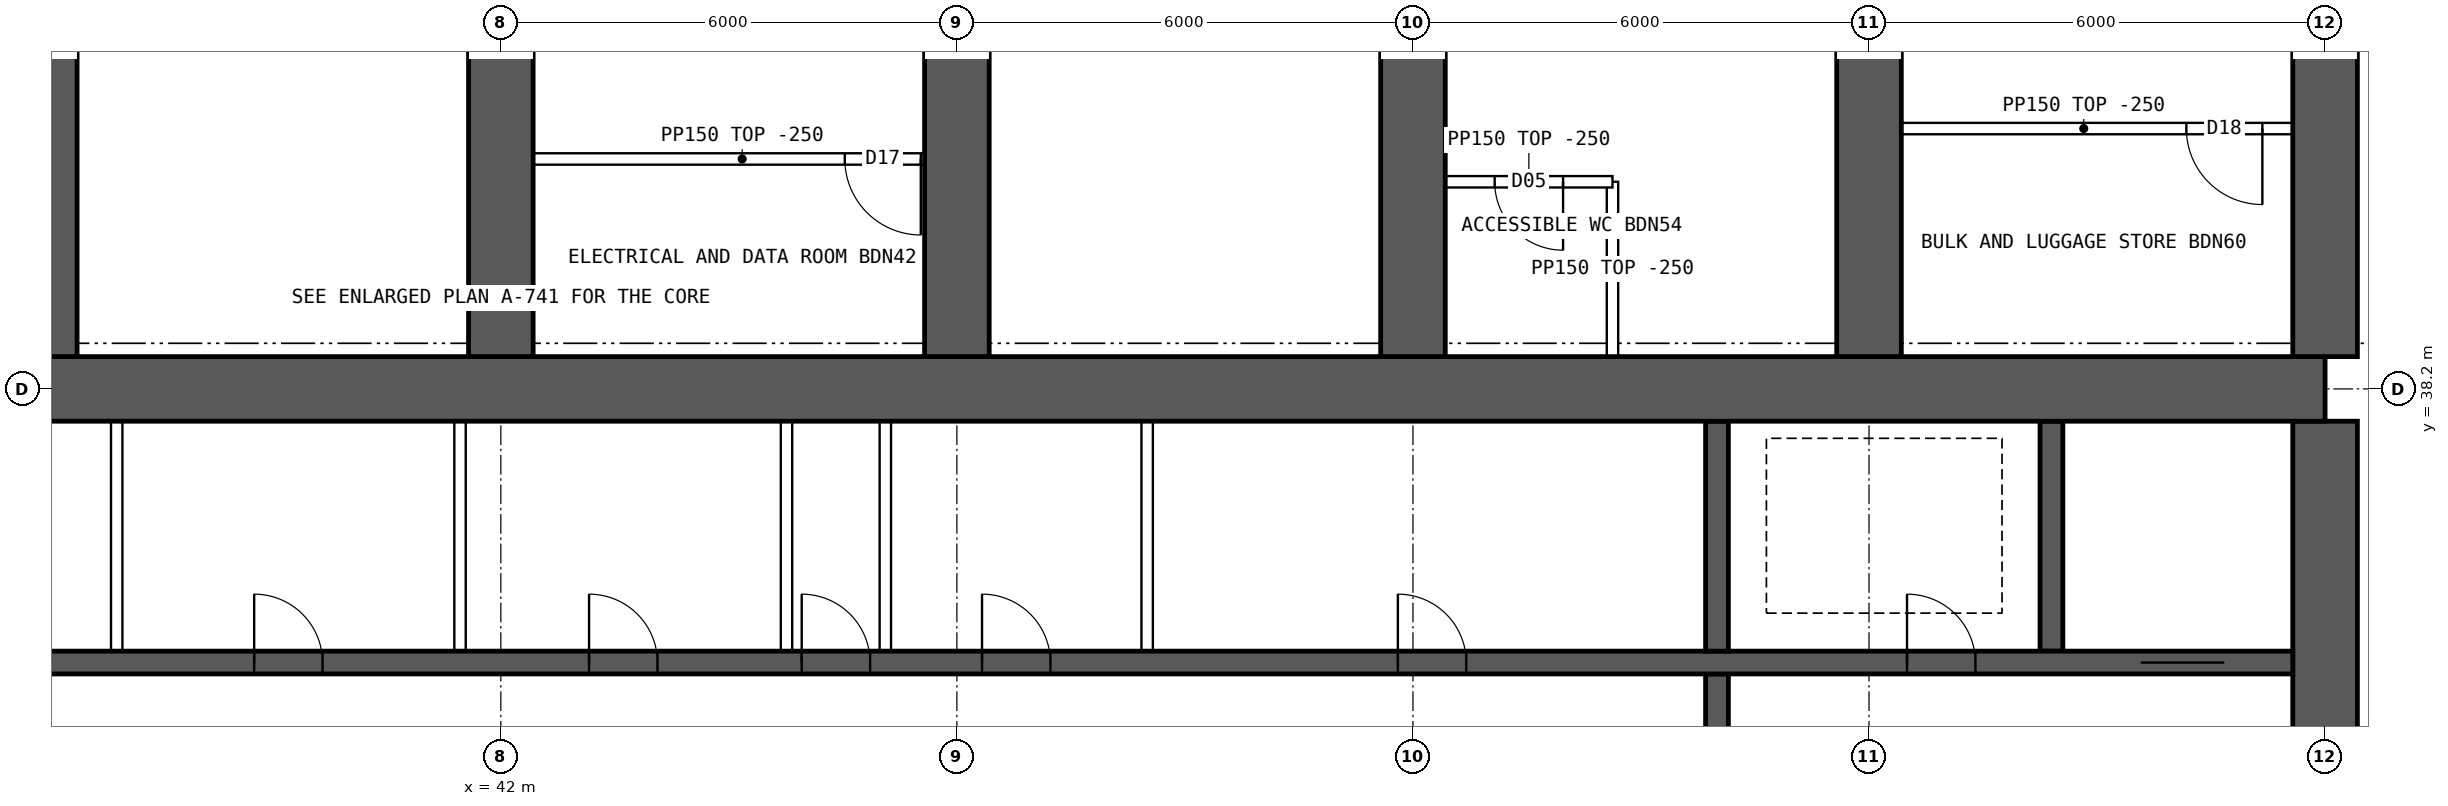
"""IFC4 building model, lengths in metres.
Left out: names, types, materials, properties, quantities, classifications, styles, units other than length and angle.
Written with IfcOpenShell. Run it as: python <this file> out.ifc"""

import sys

from ifc_helpers import new_model, si_unit, direction, frame, frame_2d, origin, place, context, subcontext, project, spatial, rectangle, extrude, element, fill, save


model = new_model("IFC4")
c1 = context("Model", 3, precision=1e-05, world=origin(), true_north=direction((0.0, 1.0)))
c2 = subcontext(c1, "Body", "Model", "MODEL_VIEW")
j1 = project(units=[si_unit("LENGTHUNIT", "METRE"), si_unit("PLANEANGLEUNIT", "RADIAN")], contexts=[c1])
p1 = place(None, origin())
s1 = spatial("IfcSite", under=j1, at=p1, CompositionType="ELEMENT")
p2 = place(p1, origin())
s2 = spatial("IfcBuilding", under=s1, at=p2, CompositionType="ELEMENT")
p3 = place(p2, frame((0.0, 0.0, 156.1)))
s3 = spatial("IfcBuildingStorey", under=s2, at=p3, CompositionType="ELEMENT", Elevation=156.1)
p4 = place(p3, frame((18.0, 38.2, 0.0), z_axis=(0.0, 0.0, 1.0), x_axis=(1.0, 0.0, 0.0)))
e1 = element("IfcWall", 1, at=p4, inside=s3, PredefinedType="SHEAR", context=c2, shape_type="SweptSolid", body=[
    extrude(rectangle(XDim=48.0, YDim=0.85, at=frame_2d((24.0, 0.0))), origin(), (0.0, 0.0, 1.0), 3.75),
])
p5 = place(p3, frame((66.0, 26.225, 0.0), z_axis=(0.0, 0.0, 1.0), x_axis=(0.0, 1.0, 0.0)))
e2 = element("IfcWall", 2, at=p5, inside=s3, PredefinedType="SHEAR", context=c2, shape_type="SweptSolid", body=[
    extrude(rectangle(XDim=11.55, YDim=0.85, at=frame_2d((5.775, 0.0))), origin(), (0.0, 0.0, 1.0), 3.75),
])
p6 = place(p5, frame((5.075, 0.0, 0.0)))
e3 = element("IfcOpeningElement", 3, at=p6, cuts=e2, PredefinedType="OPENING", context=c2, shape_type="SweptSolid", body=[
    extrude(rectangle(XDim=1.2, YDim=2.1, at=frame_2d((0.6, 1.05))), frame((0.0, 0.435, 0.0), z_axis=(0.0, -1.0, 0.0), x_axis=(1.0, 0.0, 0.0)), (0.0, 0.0, 1.0), 0.87),
])
p7 = place(p3, frame((18.425, 34.6, 0.0), z_axis=(0.0, 0.0, 1.0), x_axis=(1.0, 0.0, 0.0)))
e4 = element("IfcWall", 4, at=p7, inside=s3, PredefinedType="SHEAR", context=c2, shape_type="SweptSolid", body=[
    extrude(rectangle(XDim=47.15, YDim=0.3, at=frame_2d((23.575, 0.0))), origin(), (0.0, 0.0, 1.0), 3.75),
])
p8 = place(p7, frame((0.9, 0.0, 0.0)))
e5 = element("IfcOpeningElement", 5, at=p8, cuts=e4, PredefinedType="OPENING", context=c2, shape_type="SweptSolid", body=[
    extrude(rectangle(XDim=1.1, YDim=2.1, at=frame_2d((0.55, 1.05))), frame((0.0, 0.16, 0.0), z_axis=(0.0, -1.0, 0.0), x_axis=(1.0, 0.0, 0.0)), (0.0, 0.0, 1.0), 0.32),
])
p9 = place(p7, frame((45.15, 0.0, 0.0)))
e6 = element("IfcOpeningElement", 6, at=p9, cuts=e4, PredefinedType="OPENING", context=c2, shape_type="SweptSolid", body=[
    extrude(rectangle(XDim=1.1, YDim=2.1, at=frame_2d((0.55, 1.05))), frame((0.0, 0.16, 0.0), z_axis=(0.0, -1.0, 0.0), x_axis=(1.0, 0.0, 0.0)), (0.0, 0.0, 1.0), 0.32),
])
p10 = place(p7, frame((4.175, 0.0, 0.0)))
e7 = element("IfcOpeningElement", 7, at=p10, cuts=e4, PredefinedType="OPENING", context=c2, shape_type="SweptSolid", body=[
    extrude(rectangle(XDim=0.9, YDim=2.1, at=frame_2d((0.45, 1.05))), frame((0.0, 0.16, 0.0), z_axis=(0.0, -1.0, 0.0), x_axis=(1.0, 0.0, 0.0)), (0.0, 0.0, 1.0), 0.32),
])
p11 = place(p7, frame((42.075, 0.0, 0.0)))
e8 = element("IfcOpeningElement", 8, at=p11, cuts=e4, PredefinedType="OPENING", context=c2, shape_type="SweptSolid", body=[
    extrude(rectangle(XDim=0.9, YDim=2.1, at=frame_2d((0.45, 1.05))), frame((0.0, 0.16, 0.0), z_axis=(0.0, -1.0, 0.0), x_axis=(1.0, 0.0, 0.0)), (0.0, 0.0, 1.0), 0.32),
])
p12 = place(p7, frame((8.95, 0.0, 0.0)))
e9 = element("IfcOpeningElement", 9, at=p12, cuts=e4, PredefinedType="OPENING", context=c2, shape_type="SweptSolid", body=[
    extrude(rectangle(XDim=0.9, YDim=2.1, at=frame_2d((0.45, 1.05))), frame((0.0, 0.16, 0.0), z_axis=(0.0, -1.0, 0.0), x_axis=(1.0, 0.0, 0.0)), (0.0, 0.0, 1.0), 0.32),
])
p13 = place(p7, frame((12.924, 0.0, 0.0)))
e10 = element("IfcOpeningElement", 10, at=p13, cuts=e4, PredefinedType="OPENING", context=c2, shape_type="SweptSolid", body=[
    extrude(rectangle(XDim=0.9, YDim=2.1, at=frame_2d((0.45, 1.05))), frame((0.0, 0.16, 0.0), z_axis=(0.0, -1.0, 0.0), x_axis=(1.0, 0.0, 0.0)), (0.0, 0.0, 1.0), 0.32),
])
p14 = place(p7, frame((16.571, 0.0, 0.0)))
e11 = element("IfcOpeningElement", 11, at=p14, cuts=e4, PredefinedType="OPENING", context=c2, shape_type="SweptSolid", body=[
    extrude(rectangle(XDim=0.9, YDim=2.1, at=frame_2d((0.45, 1.05))), frame((0.0, 0.16, 0.0), z_axis=(0.0, -1.0, 0.0), x_axis=(1.0, 0.0, 0.0)), (0.0, 0.0, 1.0), 0.32),
])
p15 = place(p7, frame((20.33, 0.0, 0.0)))
e12 = element("IfcOpeningElement", 12, at=p15, cuts=e4, PredefinedType="OPENING", context=c2, shape_type="SweptSolid", body=[
    extrude(rectangle(XDim=0.9, YDim=2.1, at=frame_2d((0.45, 1.05))), frame((0.0, 0.16, 0.0), z_axis=(0.0, -1.0, 0.0), x_axis=(1.0, 0.0, 0.0)), (0.0, 0.0, 1.0), 0.32),
])
p16 = place(p7, frame((24.736, 0.0, 0.0)))
e13 = element("IfcOpeningElement", 13, at=p16, cuts=e4, PredefinedType="OPENING", context=c2, shape_type="SweptSolid", body=[
    extrude(rectangle(XDim=0.9, YDim=2.1, at=frame_2d((0.45, 1.05))), frame((0.0, 0.16, 0.0), z_axis=(0.0, -1.0, 0.0), x_axis=(1.0, 0.0, 0.0)), (0.0, 0.0, 1.0), 0.32),
])
p17 = place(p7, frame((27.533, 0.0, 0.0)))
e14 = element("IfcOpeningElement", 14, at=p17, cuts=e4, PredefinedType="OPENING", context=c2, shape_type="SweptSolid", body=[
    extrude(rectangle(XDim=0.9, YDim=2.1, at=frame_2d((0.45, 1.05))), frame((0.0, 0.16, 0.0), z_axis=(0.0, -1.0, 0.0), x_axis=(1.0, 0.0, 0.0)), (0.0, 0.0, 1.0), 0.32),
])
p18 = place(p7, frame((29.906, 0.0, 0.0)))
e15 = element("IfcOpeningElement", 15, at=p18, cuts=e4, PredefinedType="OPENING", context=c2, shape_type="SweptSolid", body=[
    extrude(rectangle(XDim=0.9, YDim=2.1, at=frame_2d((0.45, 1.05))), frame((0.0, 0.16, 0.0), z_axis=(0.0, -1.0, 0.0), x_axis=(1.0, 0.0, 0.0)), (0.0, 0.0, 1.0), 0.32),
])
p19 = place(p7, frame((35.376, 0.0, 0.0)))
e16 = element("IfcOpeningElement", 16, at=p19, cuts=e4, PredefinedType="OPENING", context=c2, shape_type="SweptSolid", body=[
    extrude(rectangle(XDim=0.9, YDim=2.1, at=frame_2d((0.45, 1.05))), frame((0.0, 0.16, 0.0), z_axis=(0.0, -1.0, 0.0), x_axis=(1.0, 0.0, 0.0)), (0.0, 0.0, 1.0), 0.32),
])
p20 = place(p3, frame((58.0, 30.55, 0.0), z_axis=(0.0, 0.0, 1.0), x_axis=(0.0, 1.0, 0.0)))
e17 = element("IfcWall", 17, at=p20, inside=s3, PredefinedType="SHEAR", context=c2, shape_type="SweptSolid", body=[
    extrude(rectangle(XDim=3.9, YDim=0.3, at=frame_2d((1.95, 0.0))), origin(), (0.0, 0.0, 1.0), 3.75),
])
p21 = place(p20, frame((1.4, 0.0, 0.0)))
e18 = element("IfcOpeningElement", 18, at=p21, cuts=e17, PredefinedType="OPENING", context=c2, shape_type="SweptSolid", body=[
    extrude(rectangle(XDim=1.2, YDim=2.1, at=frame_2d((0.6, 1.05))), frame((0.0, 0.16, 0.0), z_axis=(0.0, -1.0, 0.0), x_axis=(1.0, 0.0, 0.0)), (0.0, 0.0, 1.0), 0.32),
])
for number, where, z_axis, x_axis in (
    (19, (62.4, 34.75, 0.0), (0.0, 0.0, 1.0), (0.0, 1.0, 0.0)),
    (20, (58.0, 34.75, 0.0), (0.0, 0.0, 1.0), (0.0, 1.0, 0.0)),
):
    element("IfcWall", number, at=place(p3, frame(where, z_axis=z_axis, x_axis=x_axis)), inside=s3, PredefinedType="SHEAR", context=c2, shape_type="SweptSolid", body=[
        extrude(rectangle(XDim=3.025, YDim=0.3, at=frame_2d((1.512, 0.0))), origin(), (0.0, 0.0, 1.0), 3.75),
    ])
for number, where, z_axis, x_axis in (
    (21, (36.0, 38.625, 0.0), (0.0, 0.0, 1.0), (0.0, 1.0, 0.0)),
    (22, (42.0, 38.625, 0.0), (0.0, 0.0, 1.0), (0.0, 1.0, 0.0)),
    (23, (48.0, 38.625, 0.0), (0.0, 0.0, 1.0), (0.0, 1.0, 0.0)),
    (24, (54.0, 38.625, 0.0), (0.0, 0.0, 1.0), (0.0, 1.0, 0.0)),
    (25, (60.0, 38.625, 0.0), (0.0, 0.0, 1.0), (0.0, 1.0, 0.0)),
    (26, (66.0, 38.625, 0.0), (0.0, 0.0, 1.0), (0.0, 1.0, 0.0)),
):
    element("IfcWall", number, at=place(p3, frame(where, z_axis=z_axis, x_axis=x_axis)), inside=s3, PredefinedType="SHEAR", context=c2, shape_type="SweptSolid", body=[
        extrude(rectangle(XDim=8.175, YDim=0.85, at=frame_2d((4.087, 0.0))), origin(), (0.0, 0.0, 1.0), 3.75),
    ])
for number, where, z_axis, x_axis in (
    (27, (36.946, 34.75, 0.0), (0.0, 0.0, 1.0), (0.0, 1.0, 0.0)),
    (28, (41.463, 34.75, 0.0), (0.0, 0.0, 1.0), (0.0, 1.0, 0.0)),
    (29, (45.758, 34.75, 0.0), (0.0, 0.0, 1.0), (0.0, 1.0, 0.0)),
    (30, (47.058, 34.75, 0.0), (0.0, 0.0, 1.0), (0.0, 1.0, 0.0)),
    (31, (50.503, 34.75, 0.0), (0.0, 0.0, 1.0), (0.0, 1.0, 0.0)),
):
    element("IfcWall", number, at=place(p3, frame(where, z_axis=z_axis, x_axis=x_axis)), inside=s3, PredefinedType="SOLIDWALL", context=c2, shape_type="SweptSolid", body=[
        extrude(rectangle(XDim=3.025, YDim=0.15, at=frame_2d((1.512, 0.0))), origin(), (0.0, 0.0, 1.0), 3.5),
    ])
p22 = place(p3, frame((47.925, 41.225, 0.0), z_axis=(0.0, 0.0, 1.0), x_axis=(-1.0, 0.0, 0.0)))
e32 = element("IfcWall", 32, at=p22, inside=s3, PredefinedType="PARTITIONING", context=c2, shape_type="SweptSolid", body=[
    extrude(rectangle(XDim=5.5, YDim=0.15, at=frame_2d((2.75, 0.0))), origin(), (0.0, 0.0, 1.0), 3.5),
])
p23 = place(p22, frame((0.4, 0.0, 0.0)))
e33 = element("IfcOpeningElement", 33, at=p23, cuts=e32, PredefinedType="OPENING", context=c2, shape_type="SweptSolid", body=[
    extrude(rectangle(XDim=1.0, YDim=2.1, at=frame_2d((0.5, 1.05))), frame((0.0, 0.085, 0.0), z_axis=(0.0, -1.0, 0.0), x_axis=(1.0, 0.0, 0.0)), (0.0, 0.0, 1.0), 0.17),
])
p24 = place(p3, frame((56.625, 40.925, 0.0), z_axis=(0.0, 0.0, 1.0), x_axis=(0.0, -1.0, 0.0)))
e34 = element("IfcWall", 34, at=p24, inside=s3, PredefinedType="PARTITIONING", context=c2, shape_type="SweptSolid", body=[
    extrude(rectangle(XDim=2.3, YDim=0.15, at=frame_2d((1.15, 0.0))), origin(), (0.0, 0.0, 1.0), 3.5),
])
p25 = place(p3, frame((56.625, 40.925, 0.0), z_axis=(0.0, 0.0, 1.0), x_axis=(-1.0, 0.0, 0.0)))
e35 = element("IfcWall", 35, at=p25, inside=s3, PredefinedType="PARTITIONING", context=c2, shape_type="SweptSolid", body=[
    extrude(rectangle(XDim=2.2, YDim=0.15, at=frame_2d((1.1, 0.0))), origin(), (0.0, 0.0, 1.0), 3.5),
])
p26 = place(p25, frame((0.65, 0.0, 0.0)))
e36 = element("IfcOpeningElement", 36, at=p26, cuts=e35, PredefinedType="OPENING", context=c2, shape_type="SweptSolid", body=[
    extrude(rectangle(XDim=0.9, YDim=2.1, at=frame_2d((0.45, 1.05))), frame((0.0, 0.085, 0.0), z_axis=(0.0, -1.0, 0.0), x_axis=(1.0, 0.0, 0.0)), (0.0, 0.0, 1.0), 0.17),
])
p27 = place(p3, frame((65.575, 41.625, 0.0), z_axis=(0.0, 0.0, 1.0), x_axis=(-1.0, 0.0, 0.0)))
e37 = element("IfcWall", 37, at=p27, inside=s3, PredefinedType="PARTITIONING", context=c2, shape_type="SweptSolid", body=[
    extrude(rectangle(XDim=5.5, YDim=0.15, at=frame_2d((2.75, 0.0))), origin(), (0.0, 0.0, 1.0), 3.5),
])
p28 = place(p27, frame((0.4, 0.0, 0.0)))
e38 = element("IfcOpeningElement", 38, at=p28, cuts=e37, PredefinedType="OPENING", context=c2, shape_type="SweptSolid", body=[
    extrude(rectangle(XDim=1.0, YDim=2.1, at=frame_2d((0.5, 1.05))), frame((0.0, 0.085, 0.0), z_axis=(0.0, -1.0, 0.0), x_axis=(1.0, 0.0, 0.0)), (0.0, 0.0, 1.0), 0.17),
])
p29 = place(p9, origin())
e39 = element("IfcDoor", 39, at=p29, inside=s3, OperationType="DOUBLE_DOOR_SLIDING", PredefinedType="DOOR", context=c2, shape_type="SweptSolid", body=[
    extrude(rectangle(XDim=1.1, YDim=2.1, at=frame_2d((0.55, 1.05))), frame((0.0, 0.025, 0.0), z_axis=(0.0, -1.0, 0.0), x_axis=(1.0, 0.0, 0.0)), (0.0, 0.0, 1.0), 0.05),
])
fill(e6, e39)
p30 = place(p11, origin())
e40 = element("IfcDoor", 40, at=p30, inside=s3, OperationType="SINGLE_SWING_LEFT", PredefinedType="DOOR", context=c2, shape_type="SweptSolid", body=[
    extrude(rectangle(XDim=0.9, YDim=2.1, at=frame_2d((0.45, 1.05))), frame((0.0, 0.025, 0.0), z_axis=(0.0, -1.0, 0.0), x_axis=(1.0, 0.0, 0.0)), (0.0, 0.0, 1.0), 0.05),
])
fill(e8, e40)
p31 = place(p15, origin())
e41 = element("IfcDoor", 41, at=p31, inside=s3, OperationType="SINGLE_SWING_LEFT", PredefinedType="DOOR", context=c2, shape_type="SweptSolid", body=[
    extrude(rectangle(XDim=0.9, YDim=2.1, at=frame_2d((0.45, 1.05))), frame((0.0, 0.025, 0.0), z_axis=(0.0, -1.0, 0.0), x_axis=(1.0, 0.0, 0.0)), (0.0, 0.0, 1.0), 0.05),
])
fill(e12, e41)
p32 = place(p16, origin())
e42 = element("IfcDoor", 42, at=p32, inside=s3, OperationType="SINGLE_SWING_LEFT", PredefinedType="DOOR", context=c2, shape_type="SweptSolid", body=[
    extrude(rectangle(XDim=0.9, YDim=2.1, at=frame_2d((0.45, 1.05))), frame((0.0, 0.025, 0.0), z_axis=(0.0, -1.0, 0.0), x_axis=(1.0, 0.0, 0.0)), (0.0, 0.0, 1.0), 0.05),
])
fill(e13, e42)
p33 = place(p17, origin())
e43 = element("IfcDoor", 43, at=p33, inside=s3, OperationType="SINGLE_SWING_LEFT", PredefinedType="DOOR", context=c2, shape_type="SweptSolid", body=[
    extrude(rectangle(XDim=0.9, YDim=2.1, at=frame_2d((0.45, 1.05))), frame((0.0, 0.025, 0.0), z_axis=(0.0, -1.0, 0.0), x_axis=(1.0, 0.0, 0.0)), (0.0, 0.0, 1.0), 0.05),
])
fill(e14, e43)
p34 = place(p18, origin())
e44 = element("IfcDoor", 44, at=p34, inside=s3, OperationType="SINGLE_SWING_LEFT", PredefinedType="DOOR", context=c2, shape_type="SweptSolid", body=[
    extrude(rectangle(XDim=0.9, YDim=2.1, at=frame_2d((0.45, 1.05))), frame((0.0, 0.025, 0.0), z_axis=(0.0, -1.0, 0.0), x_axis=(1.0, 0.0, 0.0)), (0.0, 0.0, 1.0), 0.05),
])
fill(e15, e44)
p35 = place(p19, origin())
e45 = element("IfcDoor", 45, at=p35, inside=s3, OperationType="SINGLE_SWING_LEFT", PredefinedType="DOOR", context=c2, shape_type="SweptSolid", body=[
    extrude(rectangle(XDim=0.9, YDim=2.1, at=frame_2d((0.45, 1.05))), frame((0.0, 0.025, 0.0), z_axis=(0.0, -1.0, 0.0), x_axis=(1.0, 0.0, 0.0)), (0.0, 0.0, 1.0), 0.05),
])
fill(e16, e45)
p36 = place(p23, origin())
e46 = element("IfcDoor", 46, at=p36, inside=s3, OperationType="SINGLE_SWING_LEFT", PredefinedType="DOOR", context=c2, shape_type="SweptSolid", body=[
    extrude(rectangle(XDim=1.0, YDim=2.1, at=frame_2d((0.5, 1.05))), frame((0.0, 0.025, 0.0), z_axis=(0.0, -1.0, 0.0), x_axis=(1.0, 0.0, 0.0)), (0.0, 0.0, 1.0), 0.05),
])
fill(e33, e46)
p37 = place(p26, origin())
e47 = element("IfcDoor", 47, at=p37, inside=s3, OperationType="SINGLE_SWING_LEFT", PredefinedType="DOOR", context=c2, shape_type="SweptSolid", body=[
    extrude(rectangle(XDim=0.9, YDim=2.1, at=frame_2d((0.45, 1.05))), frame((0.0, 0.025, 0.0), z_axis=(0.0, -1.0, 0.0), x_axis=(1.0, 0.0, 0.0)), (0.0, 0.0, 1.0), 0.05),
])
fill(e36, e47)
p38 = place(p28, origin())
e48 = element("IfcDoor", 48, at=p38, inside=s3, OperationType="SINGLE_SWING_LEFT", PredefinedType="DOOR", context=c2, shape_type="SweptSolid", body=[
    extrude(rectangle(XDim=1.0, YDim=2.1, at=frame_2d((0.5, 1.05))), frame((0.0, 0.025, 0.0), z_axis=(0.0, -1.0, 0.0), x_axis=(1.0, 0.0, 0.0)), (0.0, 0.0, 1.0), 0.05),
])
fill(e38, e48)
save(model, sys.argv[1])
